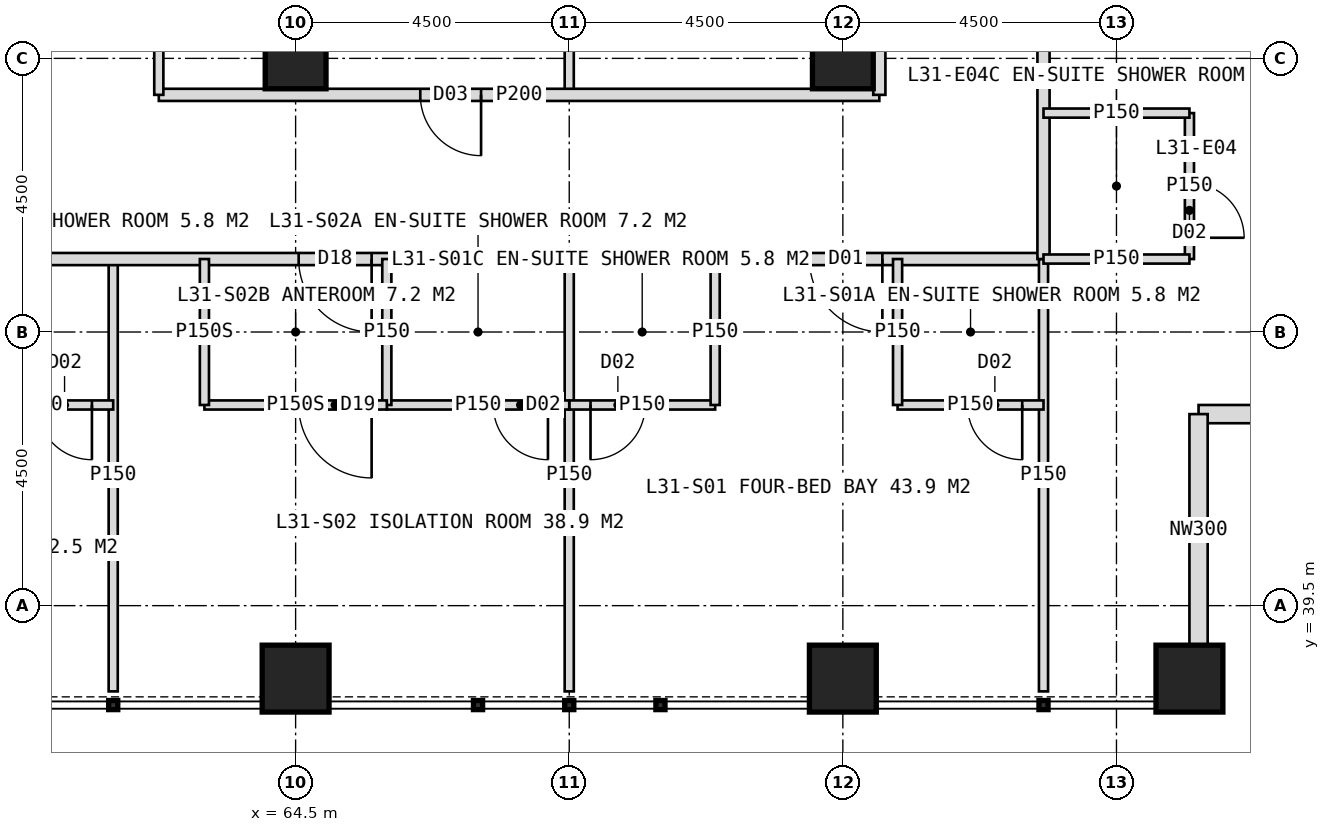
"""IFC4 building model, lengths in metres.
Left out: names, types, materials, properties, quantities, classifications, styles, units other than length and angle.
Written with IfcOpenShell. Run it as: python <this file> out.ifc"""

import sys

from ifc_helpers import new_model, si_unit, direction, frame, frame_2d, origin, origin_2d, place, context, subcontext, project, spatial, rectangle, hollow_rectangle, extrude, element, fill, save


model = new_model("IFC4")
c1 = context("Model", 3, precision=1e-05, world=origin(), true_north=direction((0.0, 1.0)))
c2 = subcontext(c1, "Body", "Model", "MODEL_VIEW")
j1 = project(units=[si_unit("LENGTHUNIT", "METRE"), si_unit("PLANEANGLEUNIT", "RADIAN")], contexts=[c1])
p1 = place(None, origin())
s1 = spatial("IfcSite", under=j1, at=p1, CompositionType="ELEMENT")
p2 = place(p1, origin())
s2 = spatial("IfcBuilding", under=s1, at=p2, CompositionType="ELEMENT")
p3 = place(p2, frame((0.0, 0.0, 132.0)))
s3 = spatial("IfcBuildingStorey", under=s2, at=p3, CompositionType="ELEMENT", Elevation=132.0)
for number, where, z_axis, x_axis in (
    (1, (73.5, 48.5, 0.0), (0.0, 0.0, 1.0), (1.0, 0.0, 0.0)),
    (2, (64.5, 48.5, 0.0), (0.0, 0.0, 1.0), (1.0, 0.0, 0.0)),
):
    element("IfcColumn", number, at=place(p3, frame(where, z_axis=z_axis, x_axis=x_axis)), inside=s3, PredefinedType="COLUMN", context=c2, shape_type="SweptSolid", body=[
        extrude(hollow_rectangle(XDim=1.0, YDim=1.0, WallThickness=0.1, at=origin_2d()), origin(), (0.0, 0.0, 1.0), 4.0),
    ])
for number, where, z_axis, x_axis in (
    (3, (64.5, 38.3, 0.0), (0.0, 0.0, 1.0), (1.0, 0.0, 0.0)),
    (4, (73.5, 38.3, 0.0), (0.0, 0.0, 1.0), (1.0, 0.0, 0.0)),
    (5, (79.2, 38.3, 0.0), (0.0, 0.0, 1.0), (1.0, 0.0, 0.0)),
):
    element("IfcColumn", number, at=place(p3, frame(where, z_axis=z_axis, x_axis=x_axis)), inside=s3, PredefinedType="COLUMN", context=c2, shape_type="SweptSolid", body=[
        extrude(hollow_rectangle(XDim=1.1, YDim=1.1, WallThickness=0.1, at=origin_2d()), origin(), (0.0, 0.0, 1.0), 4.0),
    ])
for number, where, z_axis, x_axis in (
    (6, (83.15, 42.65, 0.0), (0.0, 0.0, 1.0), (-1.0, 0.0, 0.0)),
    (7, (79.35, 42.65, 0.0), (0.0, 0.0, 1.0), (0.0, -1.0, 0.0)),
):
    element("IfcWall", number, at=place(p3, frame(where, z_axis=z_axis, x_axis=x_axis)), inside=s3, PredefinedType="ELEMENTEDWALL", context=c2, shape_type="SweptSolid", body=[
        extrude(rectangle(XDim=3.8, YDim=0.3, at=frame_2d((1.9, 0.0))), origin(), (0.0, 0.0, 1.0), 4.0),
    ])
for number, where, z_axis, x_axis in (
    (8, (69.0, 45.2, 0.0), (0.0, 0.0, 1.0), (0.0, -1.0, 0.0)),
    (9, (61.5, 45.2, 0.0), (0.0, 0.0, 1.0), (0.0, -1.0, 0.0)),
):
    element("IfcWall", number, at=place(p3, frame(where, z_axis=z_axis, x_axis=x_axis)), inside=s3, PredefinedType="PARTITIONING", context=c2, shape_type="SweptSolid", body=[
        extrude(rectangle(XDim=7.11, YDim=0.15, at=frame_2d((3.555, 0.0))), origin(), (0.0, 0.0, 1.0), 3.75),
    ])
p4 = place(p3, frame((76.8, 45.2, 0.0), z_axis=(0.0, 0.0, 1.0), x_axis=(-1.0, 0.0, 0.0)))
e10 = element("IfcWall", 10, at=p4, inside=s3, PredefinedType="PARTITIONING", context=c2, shape_type="SweptSolid", body=[
    extrude(rectangle(XDim=33.6, YDim=0.2, at=frame_2d((16.8, 0.0))), origin(), (0.0, 0.0, 1.0), 3.75),
])
p5 = place(p4, frame((2.65, 0.0, 0.0)))
e11 = element("IfcOpeningElement", 11, at=p5, cuts=e10, PredefinedType="OPENING", context=c2, shape_type="SweptSolid", body=[
    extrude(rectangle(XDim=1.2, YDim=2.2, at=frame_2d((0.6, 1.1))), frame((0.0, 0.11, 0.0), z_axis=(0.0, -1.0, 0.0), x_axis=(1.0, 0.0, 0.0)), (0.0, 0.0, 1.0), 0.22),
])
p6 = place(p4, frame((11.05, 0.0, 0.0)))
e12 = element("IfcOpeningElement", 12, at=p6, cuts=e10, PredefinedType="OPENING", context=c2, shape_type="SweptSolid", body=[
    extrude(rectangle(XDim=1.2, YDim=2.2, at=frame_2d((0.6, 1.1))), frame((0.0, 0.11, 0.0), z_axis=(0.0, -1.0, 0.0), x_axis=(1.0, 0.0, 0.0)), (0.0, 0.0, 1.0), 0.22),
])
p7 = place(p4, frame((17.95, 0.0, 0.0)))
e13 = element("IfcOpeningElement", 13, at=p7, cuts=e10, PredefinedType="OPENING", context=c2, shape_type="SweptSolid", body=[
    extrude(rectangle(XDim=1.2, YDim=2.2, at=frame_2d((0.6, 1.1))), frame((0.0, 0.11, 0.0), z_axis=(0.0, -1.0, 0.0), x_axis=(1.0, 0.0, 0.0)), (0.0, 0.0, 1.0), 0.22),
])
p8 = place(p4, frame((26.95, 0.0, 0.0)))
e14 = element("IfcOpeningElement", 14, at=p8, cuts=e10, PredefinedType="OPENING", context=c2, shape_type="SweptSolid", body=[
    extrude(rectangle(XDim=1.2, YDim=2.2, at=frame_2d((0.6, 1.1))), frame((0.0, 0.11, 0.0), z_axis=(0.0, -1.0, 0.0), x_axis=(1.0, 0.0, 0.0)), (0.0, 0.0, 1.0), 0.22),
])
p9 = place(p3, frame((76.8, 45.2, 0.0), z_axis=(0.0, 0.0, 1.0), x_axis=(0.0, -1.0, 0.0)))
e15 = element("IfcWall", 15, at=p9, inside=s3, PredefinedType="PARTITIONING", context=c2, shape_type="SweptSolid", body=[
    extrude(rectangle(XDim=7.11, YDim=0.15, at=frame_2d((3.555, 0.0))), origin(), (0.0, 0.0, 1.0), 3.75),
])
p10 = place(p3, frame((76.8, 42.8, 0.0), z_axis=(0.0, 0.0, 1.0), x_axis=(-1.0, 0.0, 0.0)))
e16 = element("IfcWall", 16, at=p10, inside=s3, PredefinedType="PARTITIONING", context=c2, shape_type="SweptSolid", body=[
    extrude(rectangle(XDim=2.4, YDim=0.15, at=frame_2d((1.2, 0.0))), origin(), (0.0, 0.0, 1.0), 2.997),
])
p11 = place(p10, frame((0.35, 0.0, 0.0)))
e17 = element("IfcOpeningElement", 17, at=p11, cuts=e16, PredefinedType="OPENING", context=c2, shape_type="SweptSolid", body=[
    extrude(rectangle(XDim=0.9, YDim=2.1, at=frame_2d((0.45, 1.05))), frame((0.0, 0.085, 0.0), z_axis=(0.0, -1.0, 0.0), x_axis=(1.0, 0.0, 0.0)), (0.0, 0.0, 1.0), 0.17),
])
p12 = place(p3, frame((74.4, 45.2, 0.0), z_axis=(0.0, 0.0, 1.0), x_axis=(0.0, -1.0, 0.0)))
e18 = element("IfcWall", 18, at=p12, inside=s3, PredefinedType="PARTITIONING", context=c2, shape_type="SweptSolid", body=[
    extrude(rectangle(XDim=2.4, YDim=0.15, at=frame_2d((1.2, 0.0))), origin(), (0.0, 0.0, 1.0), 3.75),
])
p13 = place(p3, frame((71.4, 42.8, 0.0), z_axis=(0.0, 0.0, 1.0), x_axis=(-1.0, 0.0, 0.0)))
e19 = element("IfcWall", 19, at=p13, inside=s3, PredefinedType="PARTITIONING", context=c2, shape_type="SweptSolid", body=[
    extrude(rectangle(XDim=2.4, YDim=0.15, at=frame_2d((1.2, 0.0))), origin(), (0.0, 0.0, 1.0), 3.75),
])
p14 = place(p13, frame((1.15, 0.0, 0.0)))
e20 = element("IfcOpeningElement", 20, at=p14, cuts=e19, PredefinedType="OPENING", context=c2, shape_type="SweptSolid", body=[
    extrude(rectangle(XDim=0.9, YDim=2.1, at=frame_2d((0.45, 1.05))), frame((0.0, 0.085, 0.0), z_axis=(0.0, -1.0, 0.0), x_axis=(1.0, 0.0, 0.0)), (0.0, 0.0, 1.0), 0.17),
])
p15 = place(p3, frame((71.4, 45.2, 0.0), z_axis=(0.0, 0.0, 1.0), x_axis=(0.0, -1.0, 0.0)))
e21 = element("IfcWall", 21, at=p15, inside=s3, PredefinedType="PARTITIONING", context=c2, shape_type="SweptSolid", body=[
    extrude(rectangle(XDim=2.4, YDim=0.15, at=frame_2d((1.2, 0.0))), origin(), (0.0, 0.0, 1.0), 3.75),
])
p16 = place(p3, frame((69.0, 42.8, 0.0), z_axis=(0.0, 0.0, 1.0), x_axis=(-1.0, 0.0, 0.0)))
e22 = element("IfcWall", 22, at=p16, inside=s3, PredefinedType="PARTITIONING", context=c2, shape_type="SweptSolid", body=[
    extrude(rectangle(XDim=3.0, YDim=0.15, at=frame_2d((1.5, 0.0))), origin(), (0.0, 0.0, 1.0), 3.75),
])
p17 = place(p16, frame((0.35, 0.0, 0.0)))
e23 = element("IfcOpeningElement", 23, at=p17, cuts=e22, PredefinedType="OPENING", context=c2, shape_type="SweptSolid", body=[
    extrude(rectangle(XDim=0.9, YDim=2.1, at=frame_2d((0.45, 1.05))), frame((0.0, 0.085, 0.0), z_axis=(0.0, -1.0, 0.0), x_axis=(1.0, 0.0, 0.0)), (0.0, 0.0, 1.0), 0.17),
])
p18 = place(p3, frame((66.0, 45.2, 0.0), z_axis=(0.0, 0.0, 1.0), x_axis=(0.0, -1.0, 0.0)))
e24 = element("IfcWall", 24, at=p18, inside=s3, PredefinedType="PARTITIONING", context=c2, shape_type="SweptSolid", body=[
    extrude(rectangle(XDim=2.4, YDim=0.15, at=frame_2d((1.2, 0.0))), origin(), (0.0, 0.0, 1.0), 3.75),
])
p19 = place(p3, frame((66.0, 42.8, 0.0), z_axis=(0.0, 0.0, 1.0), x_axis=(-1.0, 0.0, 0.0)))
e25 = element("IfcWall", 25, at=p19, inside=s3, PredefinedType="PARTITIONING", context=c2, shape_type="SweptSolid", body=[
    extrude(rectangle(XDim=3.0, YDim=0.15, at=frame_2d((1.5, 0.0))), origin(), (0.0, 0.0, 1.0), 3.75),
])
p20 = place(p19, frame((0.25, 0.0, 0.0)))
e26 = element("IfcOpeningElement", 26, at=p20, cuts=e25, PredefinedType="OPENING", context=c2, shape_type="SweptSolid", body=[
    extrude(rectangle(XDim=1.2, YDim=2.2, at=frame_2d((0.6, 1.1))), frame((0.0, 0.085, 0.0), z_axis=(0.0, -1.0, 0.0), x_axis=(1.0, 0.0, 0.0)), (0.0, 0.0, 1.0), 0.17),
])
p21 = place(p3, frame((63.0, 45.2, 0.0), z_axis=(0.0, 0.0, 1.0), x_axis=(0.0, -1.0, 0.0)))
e27 = element("IfcWall", 27, at=p21, inside=s3, PredefinedType="PARTITIONING", context=c2, shape_type="SweptSolid", body=[
    extrude(rectangle(XDim=2.4, YDim=0.15, at=frame_2d((1.2, 0.0))), origin(), (0.0, 0.0, 1.0), 3.75),
])
p22 = place(p3, frame((61.5, 42.8, 0.0), z_axis=(0.0, 0.0, 1.0), x_axis=(-1.0, 0.0, 0.0)))
e28 = element("IfcWall", 28, at=p22, inside=s3, PredefinedType="PARTITIONING", context=c2, shape_type="SweptSolid", body=[
    extrude(rectangle(XDim=2.4, YDim=0.15, at=frame_2d((1.2, 0.0))), origin(), (0.0, 0.0, 1.0), 3.75),
])
p23 = place(p22, frame((0.35, 0.0, 0.0)))
e29 = element("IfcOpeningElement", 29, at=p23, cuts=e28, PredefinedType="OPENING", context=c2, shape_type="SweptSolid", body=[
    extrude(rectangle(XDim=0.9, YDim=2.1, at=frame_2d((0.45, 1.05))), frame((0.0, 0.085, 0.0), z_axis=(0.0, -1.0, 0.0), x_axis=(1.0, 0.0, 0.0)), (0.0, 0.0, 1.0), 0.17),
])
p24 = place(p3, frame((69.0, 53.0, 0.0), z_axis=(0.0, 0.0, 1.0), x_axis=(0.0, -1.0, 0.0)))
e30 = element("IfcWall", 30, at=p24, inside=s3, PredefinedType="PARTITIONING", context=c2, shape_type="SweptSolid", body=[
    extrude(rectangle(XDim=5.1, YDim=0.15, at=frame_2d((2.55, 0.0))), origin(), (0.0, 0.0, 1.0), 3.75),
])
p25 = place(p3, frame((74.1, 47.9, 0.0), z_axis=(0.0, 0.0, 1.0), x_axis=(-1.0, 0.0, 0.0)))
e31 = element("IfcWall", 31, at=p25, inside=s3, PredefinedType="PARTITIONING", context=c2, shape_type="SweptSolid", body=[
    extrude(rectangle(XDim=11.85, YDim=0.2, at=frame_2d((5.925, 0.0))), origin(), (0.0, 0.0, 1.0), 3.75),
])
p26 = place(p25, frame((6.55, 0.0, 0.0)))
e32 = element("IfcOpeningElement", 32, at=p26, cuts=e31, PredefinedType="OPENING", context=c2, shape_type="SweptSolid", body=[
    extrude(rectangle(XDim=1.0, YDim=2.1, at=frame_2d((0.5, 1.05))), frame((0.0, 0.11, 0.0), z_axis=(0.0, -1.0, 0.0), x_axis=(1.0, 0.0, 0.0)), (0.0, 0.0, 1.0), 0.22),
])
p27 = place(p3, frame((62.25, 53.0, 0.0), z_axis=(0.0, 0.0, 1.0), x_axis=(0.0, -1.0, 0.0)))
e33 = element("IfcWall", 33, at=p27, inside=s3, PredefinedType="PARTITIONING", context=c2, shape_type="SweptSolid", body=[
    extrude(rectangle(XDim=5.1, YDim=0.15, at=frame_2d((2.55, 0.0))), origin(), (0.0, 0.0, 1.0), 3.75),
])
p28 = place(p3, frame((76.8, 78.8, 0.0), z_axis=(0.0, 0.0, 1.0), x_axis=(0.0, -1.0, 0.0)))
e34 = element("IfcWall", 34, at=p28, inside=s3, PredefinedType="PARTITIONING", context=c2, shape_type="SweptSolid", body=[
    extrude(rectangle(XDim=33.6, YDim=0.2, at=frame_2d((16.8, 0.0))), origin(), (0.0, 0.0, 1.0), 3.75),
])
p29 = place(p28, frame((2.65, 0.0, 0.0)))
e35 = element("IfcOpeningElement", 35, at=p29, cuts=e34, PredefinedType="OPENING", context=c2, shape_type="SweptSolid", body=[
    extrude(rectangle(XDim=1.2, YDim=2.2, at=frame_2d((0.6, 1.1))), frame((0.0, 0.11, 0.0), z_axis=(0.0, -1.0, 0.0), x_axis=(1.0, 0.0, 0.0)), (0.0, 0.0, 1.0), 0.22),
])
p30 = place(p28, frame((8.95, 0.0, 0.0)))
e36 = element("IfcOpeningElement", 36, at=p30, cuts=e34, PredefinedType="OPENING", context=c2, shape_type="SweptSolid", body=[
    extrude(rectangle(XDim=1.2, YDim=2.2, at=frame_2d((0.6, 1.1))), frame((0.0, 0.11, 0.0), z_axis=(0.0, -1.0, 0.0), x_axis=(1.0, 0.0, 0.0)), (0.0, 0.0, 1.0), 0.22),
])
p31 = place(p28, frame((19.45, 0.0, 0.0)))
e37 = element("IfcOpeningElement", 37, at=p31, cuts=e34, PredefinedType="OPENING", context=c2, shape_type="SweptSolid", body=[
    extrude(rectangle(XDim=1.2, YDim=2.2, at=frame_2d((0.6, 1.1))), frame((0.0, 0.11, 0.0), z_axis=(0.0, -1.0, 0.0), x_axis=(1.0, 0.0, 0.0)), (0.0, 0.0, 1.0), 0.22),
])
p32 = place(p28, frame((28.45, 0.0, 0.0)))
e38 = element("IfcOpeningElement", 38, at=p32, cuts=e34, PredefinedType="OPENING", context=c2, shape_type="SweptSolid", body=[
    extrude(rectangle(XDim=1.2, YDim=2.2, at=frame_2d((0.6, 1.1))), frame((0.0, 0.11, 0.0), z_axis=(0.0, -1.0, 0.0), x_axis=(1.0, 0.0, 0.0)), (0.0, 0.0, 1.0), 0.22),
])
p33 = place(p3, frame((79.2, 47.6, 0.0), z_axis=(0.0, 0.0, 1.0), x_axis=(0.0, -1.0, 0.0)))
e39 = element("IfcWall", 39, at=p33, inside=s3, PredefinedType="PARTITIONING", context=c2, shape_type="SweptSolid", body=[
    extrude(rectangle(XDim=2.4, YDim=0.15, at=frame_2d((1.2, 0.0))), origin(), (0.0, 0.0, 1.0), 2.997),
])
p34 = place(p33, frame((1.15, 0.0, 0.0)))
e40 = element("IfcOpeningElement", 40, at=p34, cuts=e39, PredefinedType="OPENING", context=c2, shape_type="SweptSolid", body=[
    extrude(rectangle(XDim=0.9, YDim=2.1, at=frame_2d((0.45, 1.05))), frame((0.0, 0.085, 0.0), z_axis=(0.0, -1.0, 0.0), x_axis=(1.0, 0.0, 0.0)), (0.0, 0.0, 1.0), 0.17),
])
for number, where, z_axis, x_axis in (
    (41, (76.8, 47.6, 0.0), (0.0, 0.0, 1.0), (1.0, 0.0, 0.0)),
    (42, (76.8, 45.2, 0.0), (0.0, 0.0, 1.0), (1.0, 0.0, 0.0)),
):
    element("IfcWall", number, at=place(p3, frame(where, z_axis=z_axis, x_axis=x_axis)), inside=s3, PredefinedType="PARTITIONING", context=c2, shape_type="SweptSolid", body=[
        extrude(rectangle(XDim=2.4, YDim=0.15, at=frame_2d((1.2, 0.0))), origin(), (0.0, 0.0, 1.0), 3.75),
    ])
p35 = place(p3, frame((74.1, 62.0, 0.0), z_axis=(0.0, 0.0, 1.0), x_axis=(0.0, -1.0, 0.0)))
e43 = element("IfcWall", 43, at=p35, inside=s3, PredefinedType="PARTITIONING", context=c2, shape_type="SweptSolid", body=[
    extrude(rectangle(XDim=14.1, YDim=0.2, at=frame_2d((7.05, 0.0))), origin(), (0.0, 0.0, 1.0), 3.75),
])
p36 = place(p35, frame((2.5, 0.0, 0.0)))
e44 = element("IfcOpeningElement", 44, at=p36, cuts=e43, PredefinedType="OPENING", context=c2, shape_type="SweptSolid", body=[
    extrude(rectangle(XDim=1.0, YDim=2.1, at=frame_2d((0.5, 1.05))), frame((0.0, 0.11, 0.0), z_axis=(0.0, -1.0, 0.0), x_axis=(1.0, 0.0, 0.0)), (0.0, 0.0, 1.0), 0.22),
])
p37 = place(p35, frame((7.75, 0.0, 0.0)))
e45 = element("IfcOpeningElement", 45, at=p37, cuts=e43, PredefinedType="OPENING", context=c2, shape_type="SweptSolid", body=[
    extrude(rectangle(XDim=1.0, YDim=2.1, at=frame_2d((0.5, 1.05))), frame((0.0, 0.11, 0.0), z_axis=(0.0, -1.0, 0.0), x_axis=(1.0, 0.0, 0.0)), (0.0, 0.0, 1.0), 0.22),
])
p38 = place(p35, frame((11.2, 0.0, 0.0)))
e46 = element("IfcOpeningElement", 46, at=p38, cuts=e43, PredefinedType="OPENING", context=c2, shape_type="SweptSolid", body=[
    extrude(rectangle(XDim=1.0, YDim=2.1, at=frame_2d((0.5, 1.05))), frame((0.0, 0.11, 0.0), z_axis=(0.0, -1.0, 0.0), x_axis=(1.0, 0.0, 0.0)), (0.0, 0.0, 1.0), 0.22),
])
p39 = place(p5, origin())
e47 = element("IfcDoor", 47, at=p39, inside=s3, OperationType="SINGLE_SWING_LEFT", PredefinedType="DOOR", context=c2, shape_type="SweptSolid", body=[
    extrude(rectangle(XDim=1.2, YDim=2.2, at=frame_2d((0.6, 1.1))), frame((0.0, 0.025, 0.0), z_axis=(0.0, -1.0, 0.0), x_axis=(1.0, 0.0, 0.0)), (0.0, 0.0, 1.0), 0.05),
])
fill(e11, e47)
p40 = place(p11, origin())
e48 = element("IfcDoor", 48, at=p40, inside=s3, OperationType="SINGLE_SWING_LEFT", PredefinedType="DOOR", context=c2, shape_type="SweptSolid", body=[
    extrude(rectangle(XDim=0.9, YDim=2.1, at=frame_2d((0.45, 1.05))), frame((0.0, 0.025, 0.0), z_axis=(0.0, -1.0, 0.0), x_axis=(1.0, 0.0, 0.0)), (0.0, 0.0, 1.0), 0.05),
])
fill(e17, e48)
p41 = place(p14, origin())
e49 = element("IfcDoor", 49, at=p41, inside=s3, OperationType="SINGLE_SWING_RIGHT", PredefinedType="DOOR", context=c2, shape_type="SweptSolid", body=[
    extrude(rectangle(XDim=0.9, YDim=2.1, at=frame_2d((0.45, 1.05))), frame((0.0, 0.025, 0.0), z_axis=(0.0, -1.0, 0.0), x_axis=(1.0, 0.0, 0.0)), (0.0, 0.0, 1.0), 0.05),
])
fill(e20, e49)
p42 = place(p20, origin())
e50 = element("IfcDoor", 50, at=p42, inside=s3, OperationType="SINGLE_SWING_LEFT", PredefinedType="DOOR", context=c2, shape_type="SweptSolid", body=[
    extrude(rectangle(XDim=1.2, YDim=2.2, at=frame_2d((0.6, 1.1))), frame((0.0, 0.025, 0.0), z_axis=(0.0, -1.0, 0.0), x_axis=(1.0, 0.0, 0.0)), (0.0, 0.0, 1.0), 0.05),
])
fill(e26, e50)
p43 = place(p6, origin())
e51 = element("IfcDoor", 51, at=p43, inside=s3, OperationType="SINGLE_SWING_LEFT", PredefinedType="DOOR", context=c2, shape_type="SweptSolid", body=[
    extrude(rectangle(XDim=1.2, YDim=2.2, at=frame_2d((0.6, 1.1))), frame((0.0, 0.025, 0.0), z_axis=(0.0, -1.0, 0.0), x_axis=(1.0, 0.0, 0.0)), (0.0, 0.0, 1.0), 0.05),
])
fill(e12, e51)
p44 = place(p17, origin())
e52 = element("IfcDoor", 52, at=p44, inside=s3, OperationType="SINGLE_SWING_LEFT", PredefinedType="DOOR", context=c2, shape_type="SweptSolid", body=[
    extrude(rectangle(XDim=0.9, YDim=2.1, at=frame_2d((0.45, 1.05))), frame((0.0, 0.025, 0.0), z_axis=(0.0, -1.0, 0.0), x_axis=(1.0, 0.0, 0.0)), (0.0, 0.0, 1.0), 0.05),
])
fill(e23, e52)
p45 = place(p23, origin())
e53 = element("IfcDoor", 53, at=p45, inside=s3, OperationType="SINGLE_SWING_LEFT", PredefinedType="DOOR", context=c2, shape_type="SweptSolid", body=[
    extrude(rectangle(XDim=0.9, YDim=2.1, at=frame_2d((0.45, 1.05))), frame((0.0, 0.025, 0.0), z_axis=(0.0, -1.0, 0.0), x_axis=(1.0, 0.0, 0.0)), (0.0, 0.0, 1.0), 0.05),
])
fill(e29, e53)
p46 = place(p26, origin())
e54 = element("IfcDoor", 54, at=p46, inside=s3, OperationType="SINGLE_SWING_LEFT", PredefinedType="DOOR", context=c2, shape_type="SweptSolid", body=[
    extrude(rectangle(XDim=1.0, YDim=2.1, at=frame_2d((0.5, 1.05))), frame((0.0, 0.025, 0.0), z_axis=(0.0, -1.0, 0.0), x_axis=(1.0, 0.0, 0.0)), (0.0, 0.0, 1.0), 0.05),
])
fill(e32, e54)
p47 = place(p34, origin())
e55 = element("IfcDoor", 55, at=p47, inside=s3, OperationType="SINGLE_SWING_RIGHT", PredefinedType="DOOR", context=c2, shape_type="SweptSolid", body=[
    extrude(rectangle(XDim=0.9, YDim=2.1, at=frame_2d((0.45, 1.05))), frame((0.0, 0.025, 0.0), z_axis=(0.0, -1.0, 0.0), x_axis=(1.0, 0.0, 0.0)), (0.0, 0.0, 1.0), 0.05),
])
fill(e40, e55)
save(model, sys.argv[1])
